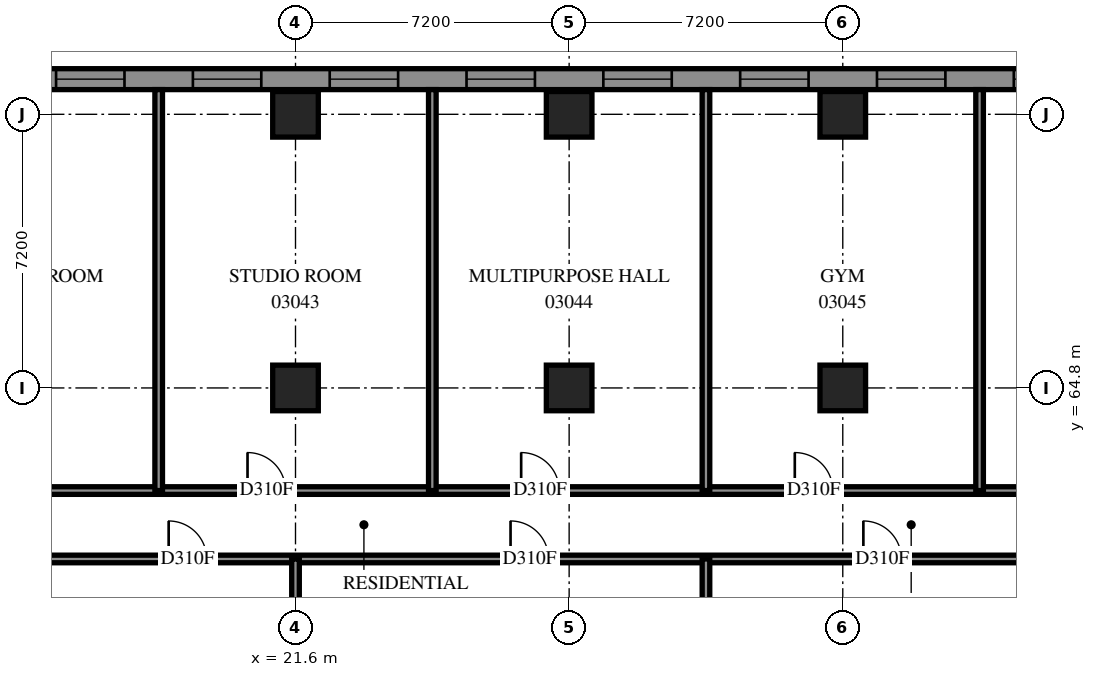
"""IFC4 building model, lengths in metres.
Left out: names, types, materials, properties, quantities, classifications, styles, units other than length and angle.
Written with IfcOpenShell. Run it as: python <this file> out.ifc"""

import sys

from ifc_helpers import new_model, si_unit, direction, frame, frame_2d, origin, origin_2d, place, context, subcontext, project, spatial, polyline, rectangle, outline, extrude, element, fill, save


model = new_model("IFC4")
c1 = context("Model", 3, precision=1e-05, world=origin(), true_north=direction((0.0, 1.0)))
c2 = subcontext(c1, "Body", "Model", "MODEL_VIEW")
j1 = project(units=[si_unit("LENGTHUNIT", "METRE"), si_unit("PLANEANGLEUNIT", "RADIAN")], contexts=[c1])
p1 = place(None, origin())
s1 = spatial("IfcSite", under=j1, at=p1, CompositionType="ELEMENT")
p2 = place(p1, origin())
s2 = spatial("IfcBuilding", under=s1, at=p2, CompositionType="ELEMENT")
p3 = place(p2, frame((0.0, 0.0, 14.4)))
s3 = spatial("IfcBuildingStorey", under=s2, at=p3, CompositionType="ELEMENT", Elevation=14.4)
for number, where, z_axis, x_axis in (
    (1, (21.6, 64.8, 0.0), (0.0, 0.0, 1.0), (1.0, 0.0, 0.0)),
    (2, (21.6, 72.0, 0.0), (0.0, 0.0, 1.0), (1.0, 0.0, 0.0)),
    (3, (28.8, 64.8, 0.0), (0.0, 0.0, 1.0), (1.0, 0.0, 0.0)),
    (4, (28.8, 72.0, 0.0), (0.0, 0.0, 1.0), (1.0, 0.0, 0.0)),
    (5, (36.0, 64.8, 0.0), (0.0, 0.0, 1.0), (1.0, 0.0, 0.0)),
    (6, (36.0, 72.0, 0.0), (0.0, 0.0, 1.0), (1.0, 0.0, 0.0)),
):
    element("IfcColumn", number, at=place(p3, frame(where, z_axis=z_axis, x_axis=x_axis)), inside=s3, PredefinedType="COLUMN", context=c2, shape_type="SweptSolid", body=[
        extrude(rectangle(XDim=1.2, YDim=1.2, at=origin_2d()), origin(), (0.0, 0.0, 1.0), 3.8),
    ])
p4 = place(p3, frame((79.583, 72.925, 0.0), z_axis=(0.0, 0.0, 1.0), x_axis=(-1.0, 0.0, 0.0)))
e7 = element("IfcWall", 7, at=p4, inside=s3, PredefinedType="SOLIDWALL", context=c2, shape_type="SweptSolid", body=[
    extrude(outline(polyline([(-0.114, -0.275), (79.583, -0.275), (79.033, 0.275), (0.114, 0.275), (-0.114, -0.275)])), origin(), (0.0, 0.0, 1.0), 3.8),
])
p5 = place(p4, frame((1.249, 0.0, 0.7)))
e8 = element("IfcOpeningElement", 8, at=p5, cuts=e7, PredefinedType="OPENING", context=c2, shape_type="SweptSolid", body=[
    extrude(rectangle(XDim=1.8, YDim=2.6, at=frame_2d((0.9, 1.3))), frame((0.0, 0.285, 0.0), z_axis=(0.0, -1.0, 0.0), x_axis=(1.0, 0.0, 0.0)), (0.0, 0.0, 1.0), 0.57),
])
p6 = place(p4, frame((4.883, 0.0, 0.7)))
e9 = element("IfcOpeningElement", 9, at=p6, cuts=e7, PredefinedType="OPENING", context=c2, shape_type="SweptSolid", body=[
    extrude(rectangle(XDim=1.8, YDim=2.6, at=frame_2d((0.9, 1.3))), frame((0.0, 0.285, 0.0), z_axis=(0.0, -1.0, 0.0), x_axis=(1.0, 0.0, 0.0)), (0.0, 0.0, 1.0), 0.57),
])
p7 = place(p4, frame((8.483, 0.0, 0.7)))
e10 = element("IfcOpeningElement", 10, at=p7, cuts=e7, PredefinedType="OPENING", context=c2, shape_type="SweptSolid", body=[
    extrude(rectangle(XDim=1.8, YDim=2.6, at=frame_2d((0.9, 1.3))), frame((0.0, 0.285, 0.0), z_axis=(0.0, -1.0, 0.0), x_axis=(1.0, 0.0, 0.0)), (0.0, 0.0, 1.0), 0.57),
])
p8 = place(p4, frame((12.083, 0.0, 0.7)))
e11 = element("IfcOpeningElement", 11, at=p8, cuts=e7, PredefinedType="OPENING", context=c2, shape_type="SweptSolid", body=[
    extrude(rectangle(XDim=1.8, YDim=2.6, at=frame_2d((0.9, 1.3))), frame((0.0, 0.285, 0.0), z_axis=(0.0, -1.0, 0.0), x_axis=(1.0, 0.0, 0.0)), (0.0, 0.0, 1.0), 0.57),
])
p9 = place(p4, frame((15.683, 0.0, 0.7)))
e12 = element("IfcOpeningElement", 12, at=p9, cuts=e7, PredefinedType="OPENING", context=c2, shape_type="SweptSolid", body=[
    extrude(rectangle(XDim=1.8, YDim=2.6, at=frame_2d((0.9, 1.3))), frame((0.0, 0.285, 0.0), z_axis=(0.0, -1.0, 0.0), x_axis=(1.0, 0.0, 0.0)), (0.0, 0.0, 1.0), 0.57),
])
p10 = place(p4, frame((19.283, 0.0, 0.7)))
e13 = element("IfcOpeningElement", 13, at=p10, cuts=e7, PredefinedType="OPENING", context=c2, shape_type="SweptSolid", body=[
    extrude(rectangle(XDim=1.8, YDim=2.6, at=frame_2d((0.9, 1.3))), frame((0.0, 0.285, 0.0), z_axis=(0.0, -1.0, 0.0), x_axis=(1.0, 0.0, 0.0)), (0.0, 0.0, 1.0), 0.57),
])
p11 = place(p4, frame((22.883, 0.0, 0.7)))
e14 = element("IfcOpeningElement", 14, at=p11, cuts=e7, PredefinedType="OPENING", context=c2, shape_type="SweptSolid", body=[
    extrude(rectangle(XDim=1.8, YDim=2.6, at=frame_2d((0.9, 1.3))), frame((0.0, 0.285, 0.0), z_axis=(0.0, -1.0, 0.0), x_axis=(1.0, 0.0, 0.0)), (0.0, 0.0, 1.0), 0.57),
])
p12 = place(p4, frame((26.483, 0.0, 0.7)))
e15 = element("IfcOpeningElement", 15, at=p12, cuts=e7, PredefinedType="OPENING", context=c2, shape_type="SweptSolid", body=[
    extrude(rectangle(XDim=1.8, YDim=2.6, at=frame_2d((0.9, 1.3))), frame((0.0, 0.285, 0.0), z_axis=(0.0, -1.0, 0.0), x_axis=(1.0, 0.0, 0.0)), (0.0, 0.0, 1.0), 0.57),
])
p13 = place(p4, frame((30.083, 0.0, 0.7)))
e16 = element("IfcOpeningElement", 16, at=p13, cuts=e7, PredefinedType="OPENING", context=c2, shape_type="SweptSolid", body=[
    extrude(rectangle(XDim=1.8, YDim=2.6, at=frame_2d((0.9, 1.3))), frame((0.0, 0.285, 0.0), z_axis=(0.0, -1.0, 0.0), x_axis=(1.0, 0.0, 0.0)), (0.0, 0.0, 1.0), 0.57),
])
p14 = place(p4, frame((33.683, 0.0, 0.7)))
e17 = element("IfcOpeningElement", 17, at=p14, cuts=e7, PredefinedType="OPENING", context=c2, shape_type="SweptSolid", body=[
    extrude(rectangle(XDim=1.8, YDim=2.6, at=frame_2d((0.9, 1.3))), frame((0.0, 0.285, 0.0), z_axis=(0.0, -1.0, 0.0), x_axis=(1.0, 0.0, 0.0)), (0.0, 0.0, 1.0), 0.57),
])
p15 = place(p4, frame((37.283, 0.0, 0.7)))
e18 = element("IfcOpeningElement", 18, at=p15, cuts=e7, PredefinedType="OPENING", context=c2, shape_type="SweptSolid", body=[
    extrude(rectangle(XDim=1.8, YDim=2.6, at=frame_2d((0.9, 1.3))), frame((0.0, 0.285, 0.0), z_axis=(0.0, -1.0, 0.0), x_axis=(1.0, 0.0, 0.0)), (0.0, 0.0, 1.0), 0.57),
])
p16 = place(p4, frame((40.883, 0.0, 0.7)))
e19 = element("IfcOpeningElement", 19, at=p16, cuts=e7, PredefinedType="OPENING", context=c2, shape_type="SweptSolid", body=[
    extrude(rectangle(XDim=1.8, YDim=2.6, at=frame_2d((0.9, 1.3))), frame((0.0, 0.285, 0.0), z_axis=(0.0, -1.0, 0.0), x_axis=(1.0, 0.0, 0.0)), (0.0, 0.0, 1.0), 0.57),
])
p17 = place(p4, frame((44.483, 0.0, 0.7)))
e20 = element("IfcOpeningElement", 20, at=p17, cuts=e7, PredefinedType="OPENING", context=c2, shape_type="SweptSolid", body=[
    extrude(rectangle(XDim=1.8, YDim=2.6, at=frame_2d((0.9, 1.3))), frame((0.0, 0.285, 0.0), z_axis=(0.0, -1.0, 0.0), x_axis=(1.0, 0.0, 0.0)), (0.0, 0.0, 1.0), 0.57),
])
p18 = place(p4, frame((48.083, 0.0, 0.7)))
e21 = element("IfcOpeningElement", 21, at=p18, cuts=e7, PredefinedType="OPENING", context=c2, shape_type="SweptSolid", body=[
    extrude(rectangle(XDim=1.8, YDim=2.6, at=frame_2d((0.9, 1.3))), frame((0.0, 0.285, 0.0), z_axis=(0.0, -1.0, 0.0), x_axis=(1.0, 0.0, 0.0)), (0.0, 0.0, 1.0), 0.57),
])
p19 = place(p4, frame((51.683, 0.0, 0.7)))
e22 = element("IfcOpeningElement", 22, at=p19, cuts=e7, PredefinedType="OPENING", context=c2, shape_type="SweptSolid", body=[
    extrude(rectangle(XDim=1.8, YDim=2.6, at=frame_2d((0.9, 1.3))), frame((0.0, 0.285, 0.0), z_axis=(0.0, -1.0, 0.0), x_axis=(1.0, 0.0, 0.0)), (0.0, 0.0, 1.0), 0.57),
])
p20 = place(p4, frame((55.283, 0.0, 0.7)))
e23 = element("IfcOpeningElement", 23, at=p20, cuts=e7, PredefinedType="OPENING", context=c2, shape_type="SweptSolid", body=[
    extrude(rectangle(XDim=1.8, YDim=2.6, at=frame_2d((0.9, 1.3))), frame((0.0, 0.285, 0.0), z_axis=(0.0, -1.0, 0.0), x_axis=(1.0, 0.0, 0.0)), (0.0, 0.0, 1.0), 0.57),
])
p21 = place(p4, frame((58.883, 0.0, 0.7)))
e24 = element("IfcOpeningElement", 24, at=p21, cuts=e7, PredefinedType="OPENING", context=c2, shape_type="SweptSolid", body=[
    extrude(rectangle(XDim=1.8, YDim=2.6, at=frame_2d((0.9, 1.3))), frame((0.0, 0.285, 0.0), z_axis=(0.0, -1.0, 0.0), x_axis=(1.0, 0.0, 0.0)), (0.0, 0.0, 1.0), 0.57),
])
p22 = place(p4, frame((62.483, 0.0, 0.7)))
e25 = element("IfcOpeningElement", 25, at=p22, cuts=e7, PredefinedType="OPENING", context=c2, shape_type="SweptSolid", body=[
    extrude(rectangle(XDim=1.8, YDim=2.6, at=frame_2d((0.9, 1.3))), frame((0.0, 0.285, 0.0), z_axis=(0.0, -1.0, 0.0), x_axis=(1.0, 0.0, 0.0)), (0.0, 0.0, 1.0), 0.57),
])
p23 = place(p4, frame((66.083, 0.0, 0.7)))
e26 = element("IfcOpeningElement", 26, at=p23, cuts=e7, PredefinedType="OPENING", context=c2, shape_type="SweptSolid", body=[
    extrude(rectangle(XDim=1.8, YDim=2.6, at=frame_2d((0.9, 1.3))), frame((0.0, 0.285, 0.0), z_axis=(0.0, -1.0, 0.0), x_axis=(1.0, 0.0, 0.0)), (0.0, 0.0, 1.0), 0.57),
])
p24 = place(p4, frame((69.683, 0.0, 0.7)))
e27 = element("IfcOpeningElement", 27, at=p24, cuts=e7, PredefinedType="OPENING", context=c2, shape_type="SweptSolid", body=[
    extrude(rectangle(XDim=1.8, YDim=2.6, at=frame_2d((0.9, 1.3))), frame((0.0, 0.285, 0.0), z_axis=(0.0, -1.0, 0.0), x_axis=(1.0, 0.0, 0.0)), (0.0, 0.0, 1.0), 0.57),
])
p25 = place(p4, frame((73.683, 0.0, 0.7)))
e28 = element("IfcOpeningElement", 28, at=p25, cuts=e7, PredefinedType="OPENING", context=c2, shape_type="SweptSolid", body=[
    extrude(rectangle(XDim=1.8, YDim=2.6, at=frame_2d((0.9, 1.3))), frame((0.0, 0.285, 0.0), z_axis=(0.0, -1.0, 0.0), x_axis=(1.0, 0.0, 0.0)), (0.0, 0.0, 1.0), 0.57),
])
p26 = place(p4, frame((76.508, 0.0, 0.7)))
e29 = element("IfcOpeningElement", 29, at=p26, cuts=e7, PredefinedType="OPENING", context=c2, shape_type="SweptSolid", body=[
    extrude(rectangle(XDim=1.8, YDim=2.6, at=frame_2d((0.9, 1.3))), frame((0.0, 0.285, 0.0), z_axis=(0.0, -1.0, 0.0), x_axis=(1.0, 0.0, 0.0)), (0.0, 0.0, 1.0), 0.57),
])
p27 = place(p3, frame((0.002, 60.3, 0.0), z_axis=(0.0, 0.0, 1.0), x_axis=(1.0, 0.0, 0.0)))
e30 = element("IfcWall", 30, at=p27, inside=s3, PredefinedType="PARTITIONING", context=c2, shape_type="SweptSolid", body=[
    extrude(rectangle(XDim=54.798, YDim=0.2, at=frame_2d((27.399, 0.0))), origin(), (0.0, 0.0, 1.0), 3.8),
])
p28 = place(p27, frame((18.261, 0.0, 0.0)))
e31 = element("IfcOpeningElement", 31, at=p28, cuts=e30, PredefinedType="OPENING", context=c2, shape_type="SweptSolid", body=[
    extrude(rectangle(XDim=1.0, YDim=2.1, at=frame_2d((0.5, 1.05))), frame((0.0, 0.11, 0.0), z_axis=(0.0, -1.0, 0.0), x_axis=(1.0, 0.0, 0.0)), (0.0, 0.0, 1.0), 0.22),
])
p29 = place(p27, frame((27.256, 0.0, 0.0)))
e32 = element("IfcOpeningElement", 32, at=p29, cuts=e30, PredefinedType="OPENING", context=c2, shape_type="SweptSolid", body=[
    extrude(rectangle(XDim=1.0, YDim=2.1, at=frame_2d((0.5, 1.05))), frame((0.0, 0.11, 0.0), z_axis=(0.0, -1.0, 0.0), x_axis=(1.0, 0.0, 0.0)), (0.0, 0.0, 1.0), 0.22),
])
p30 = place(p27, frame((36.54, 0.0, 0.0)))
e33 = element("IfcOpeningElement", 33, at=p30, cuts=e30, PredefinedType="OPENING", context=c2, shape_type="SweptSolid", body=[
    extrude(rectangle(XDim=1.0, YDim=2.1, at=frame_2d((0.5, 1.05))), frame((0.0, 0.11, 0.0), z_axis=(0.0, -1.0, 0.0), x_axis=(1.0, 0.0, 0.0)), (0.0, 0.0, 1.0), 0.22),
])
p31 = place(p27, frame((47.06, 0.0, 0.0)))
e34 = element("IfcOpeningElement", 34, at=p31, cuts=e30, PredefinedType="OPENING", context=c2, shape_type="SweptSolid", body=[
    extrude(rectangle(XDim=1.0, YDim=2.1, at=frame_2d((0.5, 1.05))), frame((0.0, 0.11, 0.0), z_axis=(0.0, -1.0, 0.0), x_axis=(1.0, 0.0, 0.0)), (0.0, 0.0, 1.0), 0.22),
])
p32 = place(p27, frame((3.898, 0.0, 0.0)))
e35 = element("IfcOpeningElement", 35, at=p32, cuts=e30, PredefinedType="OPENING", context=c2, shape_type="SweptSolid", body=[
    extrude(rectangle(XDim=1.0, YDim=2.1, at=frame_2d((0.5, 1.05))), frame((0.0, 0.11, 0.0), z_axis=(0.0, -1.0, 0.0), x_axis=(1.0, 0.0, 0.0)), (0.0, 0.0, 1.0), 0.22),
])
p33 = place(p3, frame((0.002, 62.1, 0.0), z_axis=(0.0, 0.0, 1.0), x_axis=(1.0, 0.0, 0.0)))
e36 = element("IfcWall", 36, at=p33, inside=s3, PredefinedType="PARTITIONING", context=c2, shape_type="SweptSolid", body=[
    extrude(rectangle(XDim=54.798, YDim=0.2, at=frame_2d((27.399, 0.0))), origin(), (0.0, 0.0, 1.0), 3.8),
])
p34 = place(p33, frame((8.667, 0.0, 0.0)))
e37 = element("IfcOpeningElement", 37, at=p34, cuts=e36, PredefinedType="OPENING", context=c2, shape_type="SweptSolid", body=[
    extrude(rectangle(XDim=1.0, YDim=2.1, at=frame_2d((0.5, 1.05))), frame((0.0, 0.11, 0.0), z_axis=(0.0, -1.0, 0.0), x_axis=(1.0, 0.0, 0.0)), (0.0, 0.0, 1.0), 0.22),
])
p35 = place(p33, frame((13.136, 0.0, 0.0)))
e38 = element("IfcOpeningElement", 38, at=p35, cuts=e36, PredefinedType="OPENING", context=c2, shape_type="SweptSolid", body=[
    extrude(rectangle(XDim=1.0, YDim=2.1, at=frame_2d((0.5, 1.05))), frame((0.0, 0.11, 0.0), z_axis=(0.0, -1.0, 0.0), x_axis=(1.0, 0.0, 0.0)), (0.0, 0.0, 1.0), 0.22),
])
p36 = place(p33, frame((20.335, 0.0, 0.0)))
e39 = element("IfcOpeningElement", 39, at=p36, cuts=e36, PredefinedType="OPENING", context=c2, shape_type="SweptSolid", body=[
    extrude(rectangle(XDim=1.0, YDim=2.1, at=frame_2d((0.5, 1.05))), frame((0.0, 0.11, 0.0), z_axis=(0.0, -1.0, 0.0), x_axis=(1.0, 0.0, 0.0)), (0.0, 0.0, 1.0), 0.22),
])
p37 = place(p33, frame((27.535, 0.0, 0.0)))
e40 = element("IfcOpeningElement", 40, at=p37, cuts=e36, PredefinedType="OPENING", context=c2, shape_type="SweptSolid", body=[
    extrude(rectangle(XDim=1.0, YDim=2.1, at=frame_2d((0.5, 1.05))), frame((0.0, 0.11, 0.0), z_axis=(0.0, -1.0, 0.0), x_axis=(1.0, 0.0, 0.0)), (0.0, 0.0, 1.0), 0.22),
])
p38 = place(p33, frame((34.736, 0.0, 0.0)))
e41 = element("IfcOpeningElement", 41, at=p38, cuts=e36, PredefinedType="OPENING", context=c2, shape_type="SweptSolid", body=[
    extrude(rectangle(XDim=1.0, YDim=2.1, at=frame_2d((0.5, 1.05))), frame((0.0, 0.11, 0.0), z_axis=(0.0, -1.0, 0.0), x_axis=(1.0, 0.0, 0.0)), (0.0, 0.0, 1.0), 0.22),
])
p39 = place(p33, frame((41.935, 0.0, 0.0)))
e42 = element("IfcOpeningElement", 42, at=p39, cuts=e36, PredefinedType="OPENING", context=c2, shape_type="SweptSolid", body=[
    extrude(rectangle(XDim=1.0, YDim=2.1, at=frame_2d((0.5, 1.05))), frame((0.0, 0.11, 0.0), z_axis=(0.0, -1.0, 0.0), x_axis=(1.0, 0.0, 0.0)), (0.0, 0.0, 1.0), 0.22),
])
p40 = place(p33, frame((49.136, 0.0, 0.0)))
e43 = element("IfcOpeningElement", 43, at=p40, cuts=e36, PredefinedType="OPENING", context=c2, shape_type="SweptSolid", body=[
    extrude(rectangle(XDim=1.0, YDim=2.1, at=frame_2d((0.5, 1.05))), frame((0.0, 0.11, 0.0), z_axis=(0.0, -1.0, 0.0), x_axis=(1.0, 0.0, 0.0)), (0.0, 0.0, 1.0), 0.22),
])
p41 = place(p33, frame((4.799, 0.0, 0.0)))
e44 = element("IfcOpeningElement", 44, at=p41, cuts=e36, PredefinedType="OPENING", context=c2, shape_type="SweptSolid", body=[
    extrude(rectangle(XDim=1.0, YDim=2.1, at=frame_2d((0.5, 1.05))), frame((0.0, 0.11, 0.0), z_axis=(0.0, -1.0, 0.0), x_axis=(1.0, 0.0, 0.0)), (0.0, 0.0, 1.0), 0.22),
])
for number, where, z_axis, x_axis in (
    (45, (18.0, 62.1, 0.0), (0.0, 0.0, 1.0), (0.0, 1.0, 0.0)),
    (46, (25.2, 62.1, 0.0), (0.0, 0.0, 1.0), (0.0, 1.0, 0.0)),
    (47, (32.4, 62.1, 0.0), (0.0, 0.0, 1.0), (0.0, 1.0, 0.0)),
    (48, (39.6, 62.1, 0.0), (0.0, 0.0, 1.0), (0.0, 1.0, 0.0)),
):
    element("IfcWall", number, at=place(p3, frame(where, z_axis=z_axis, x_axis=x_axis)), inside=s3, PredefinedType="PARTITIONING", context=c2, shape_type="SweptSolid", body=[
        extrude(rectangle(XDim=10.55, YDim=0.2, at=frame_2d((5.275, 0.0))), origin(), (0.0, 0.0, 1.0), 3.8),
    ])
p42 = place(p3, frame((32.4, 54.9, 0.0), z_axis=(0.0, 0.0, 1.0), x_axis=(0.0, 1.0, 0.0)))
e49 = element("IfcWall", 49, at=p42, inside=s3, PredefinedType="PARTITIONING", context=c2, shape_type="SweptSolid", body=[
    extrude(rectangle(XDim=5.4, YDim=0.2, at=frame_2d((2.7, 0.0))), origin(), (0.0, 0.0, 1.0), 3.8),
])
p43 = place(p3, frame((21.6, 58.2, 0.0), z_axis=(0.0, 0.0, 1.0), x_axis=(0.0, 1.0, 0.0)))
e50 = element("IfcWall", 50, at=p43, inside=s3, PredefinedType="PARTITIONING", context=c2, shape_type="SweptSolid", body=[
    extrude(rectangle(XDim=2.1, YDim=0.2, at=frame_2d((1.05, 0.0))), origin(), (0.0, 0.0, 1.0), 3.8),
])
p44 = place(p15, origin())
e51 = element("IfcWindow", 51, at=p44, inside=s3, PartitioningType="SINGLE_PANEL", PredefinedType="WINDOW", context=c2, shape_type="SweptSolid", body=[
    extrude(rectangle(XDim=1.8, YDim=2.6, at=frame_2d((0.9, 1.3))), frame((0.0, 0.155, 0.0), z_axis=(0.0, -1.0, 0.0), x_axis=(1.0, 0.0, 0.0)), (0.0, 0.0, 1.0), 0.06),
])
fill(e18, e51)
p45 = place(p16, origin())
e52 = element("IfcWindow", 52, at=p45, inside=s3, PartitioningType="SINGLE_PANEL", PredefinedType="WINDOW", context=c2, shape_type="SweptSolid", body=[
    extrude(rectangle(XDim=1.8, YDim=2.6, at=frame_2d((0.9, 1.3))), frame((0.0, 0.155, 0.0), z_axis=(0.0, -1.0, 0.0), x_axis=(1.0, 0.0, 0.0)), (0.0, 0.0, 1.0), 0.06),
])
fill(e19, e52)
p46 = place(p17, origin())
e53 = element("IfcWindow", 53, at=p46, inside=s3, PartitioningType="SINGLE_PANEL", PredefinedType="WINDOW", context=c2, shape_type="SweptSolid", body=[
    extrude(rectangle(XDim=1.8, YDim=2.6, at=frame_2d((0.9, 1.3))), frame((0.0, 0.155, 0.0), z_axis=(0.0, -1.0, 0.0), x_axis=(1.0, 0.0, 0.0)), (0.0, 0.0, 1.0), 0.06),
])
fill(e20, e53)
p47 = place(p18, origin())
e54 = element("IfcWindow", 54, at=p47, inside=s3, PartitioningType="SINGLE_PANEL", PredefinedType="WINDOW", context=c2, shape_type="SweptSolid", body=[
    extrude(rectangle(XDim=1.8, YDim=2.6, at=frame_2d((0.9, 1.3))), frame((0.0, 0.155, 0.0), z_axis=(0.0, -1.0, 0.0), x_axis=(1.0, 0.0, 0.0)), (0.0, 0.0, 1.0), 0.06),
])
fill(e21, e54)
p48 = place(p19, origin())
e55 = element("IfcWindow", 55, at=p48, inside=s3, PartitioningType="SINGLE_PANEL", PredefinedType="WINDOW", context=c2, shape_type="SweptSolid", body=[
    extrude(rectangle(XDim=1.8, YDim=2.6, at=frame_2d((0.9, 1.3))), frame((0.0, 0.155, 0.0), z_axis=(0.0, -1.0, 0.0), x_axis=(1.0, 0.0, 0.0)), (0.0, 0.0, 1.0), 0.06),
])
fill(e22, e55)
p49 = place(p20, origin())
e56 = element("IfcWindow", 56, at=p49, inside=s3, PartitioningType="SINGLE_PANEL", PredefinedType="WINDOW", context=c2, shape_type="SweptSolid", body=[
    extrude(rectangle(XDim=1.8, YDim=2.6, at=frame_2d((0.9, 1.3))), frame((0.0, 0.155, 0.0), z_axis=(0.0, -1.0, 0.0), x_axis=(1.0, 0.0, 0.0)), (0.0, 0.0, 1.0), 0.06),
])
fill(e23, e56)
p50 = place(p21, origin())
e57 = element("IfcWindow", 57, at=p50, inside=s3, PartitioningType="SINGLE_PANEL", PredefinedType="WINDOW", context=c2, shape_type="SweptSolid", body=[
    extrude(rectangle(XDim=1.8, YDim=2.6, at=frame_2d((0.9, 1.3))), frame((0.0, 0.155, 0.0), z_axis=(0.0, -1.0, 0.0), x_axis=(1.0, 0.0, 0.0)), (0.0, 0.0, 1.0), 0.06),
])
fill(e24, e57)
p51 = place(p22, origin())
e58 = element("IfcWindow", 58, at=p51, inside=s3, PartitioningType="SINGLE_PANEL", PredefinedType="WINDOW", context=c2, shape_type="SweptSolid", body=[
    extrude(rectangle(XDim=1.8, YDim=2.6, at=frame_2d((0.9, 1.3))), frame((0.0, 0.155, 0.0), z_axis=(0.0, -1.0, 0.0), x_axis=(1.0, 0.0, 0.0)), (0.0, 0.0, 1.0), 0.06),
])
fill(e25, e58)
p52 = place(p28, origin())
e59 = element("IfcDoor", 59, at=p52, inside=s3, OperationType="SINGLE_SWING_LEFT", PredefinedType="DOOR", context=c2, shape_type="SweptSolid", body=[
    extrude(rectangle(XDim=1.0, YDim=2.1, at=frame_2d((0.5, 1.05))), frame((0.0, 0.025, 0.0), z_axis=(0.0, -1.0, 0.0), x_axis=(1.0, 0.0, 0.0)), (0.0, 0.0, 1.0), 0.05),
])
fill(e31, e59)
p53 = place(p29, origin())
e60 = element("IfcDoor", 60, at=p53, inside=s3, OperationType="SINGLE_SWING_LEFT", PredefinedType="DOOR", context=c2, shape_type="SweptSolid", body=[
    extrude(rectangle(XDim=1.0, YDim=2.1, at=frame_2d((0.5, 1.05))), frame((0.0, 0.025, 0.0), z_axis=(0.0, -1.0, 0.0), x_axis=(1.0, 0.0, 0.0)), (0.0, 0.0, 1.0), 0.05),
])
fill(e32, e60)
p54 = place(p30, origin())
e61 = element("IfcDoor", 61, at=p54, inside=s3, OperationType="SINGLE_SWING_RIGHT", PredefinedType="DOOR", context=c2, shape_type="SweptSolid", body=[
    extrude(rectangle(XDim=1.0, YDim=2.1, at=frame_2d((0.5, 1.05))), frame((0.0, 0.025, 0.0), z_axis=(0.0, -1.0, 0.0), x_axis=(1.0, 0.0, 0.0)), (0.0, 0.0, 1.0), 0.05),
])
fill(e33, e61)
p55 = place(p36, origin())
e62 = element("IfcDoor", 62, at=p55, inside=s3, OperationType="SINGLE_SWING_LEFT", PredefinedType="DOOR", context=c2, shape_type="SweptSolid", body=[
    extrude(rectangle(XDim=1.0, YDim=2.1, at=frame_2d((0.5, 1.05))), frame((0.0, 0.025, 0.0), z_axis=(0.0, -1.0, 0.0), x_axis=(1.0, 0.0, 0.0)), (0.0, 0.0, 1.0), 0.05),
])
fill(e39, e62)
p56 = place(p37, origin())
e63 = element("IfcDoor", 63, at=p56, inside=s3, OperationType="SINGLE_SWING_LEFT", PredefinedType="DOOR", context=c2, shape_type="SweptSolid", body=[
    extrude(rectangle(XDim=1.0, YDim=2.1, at=frame_2d((0.5, 1.05))), frame((0.0, 0.025, 0.0), z_axis=(0.0, -1.0, 0.0), x_axis=(1.0, 0.0, 0.0)), (0.0, 0.0, 1.0), 0.05),
])
fill(e40, e63)
p57 = place(p38, origin())
e64 = element("IfcDoor", 64, at=p57, inside=s3, OperationType="SINGLE_SWING_LEFT", PredefinedType="DOOR", context=c2, shape_type="SweptSolid", body=[
    extrude(rectangle(XDim=1.0, YDim=2.1, at=frame_2d((0.5, 1.05))), frame((0.0, 0.025, 0.0), z_axis=(0.0, -1.0, 0.0), x_axis=(1.0, 0.0, 0.0)), (0.0, 0.0, 1.0), 0.05),
])
fill(e41, e64)
save(model, sys.argv[1])
